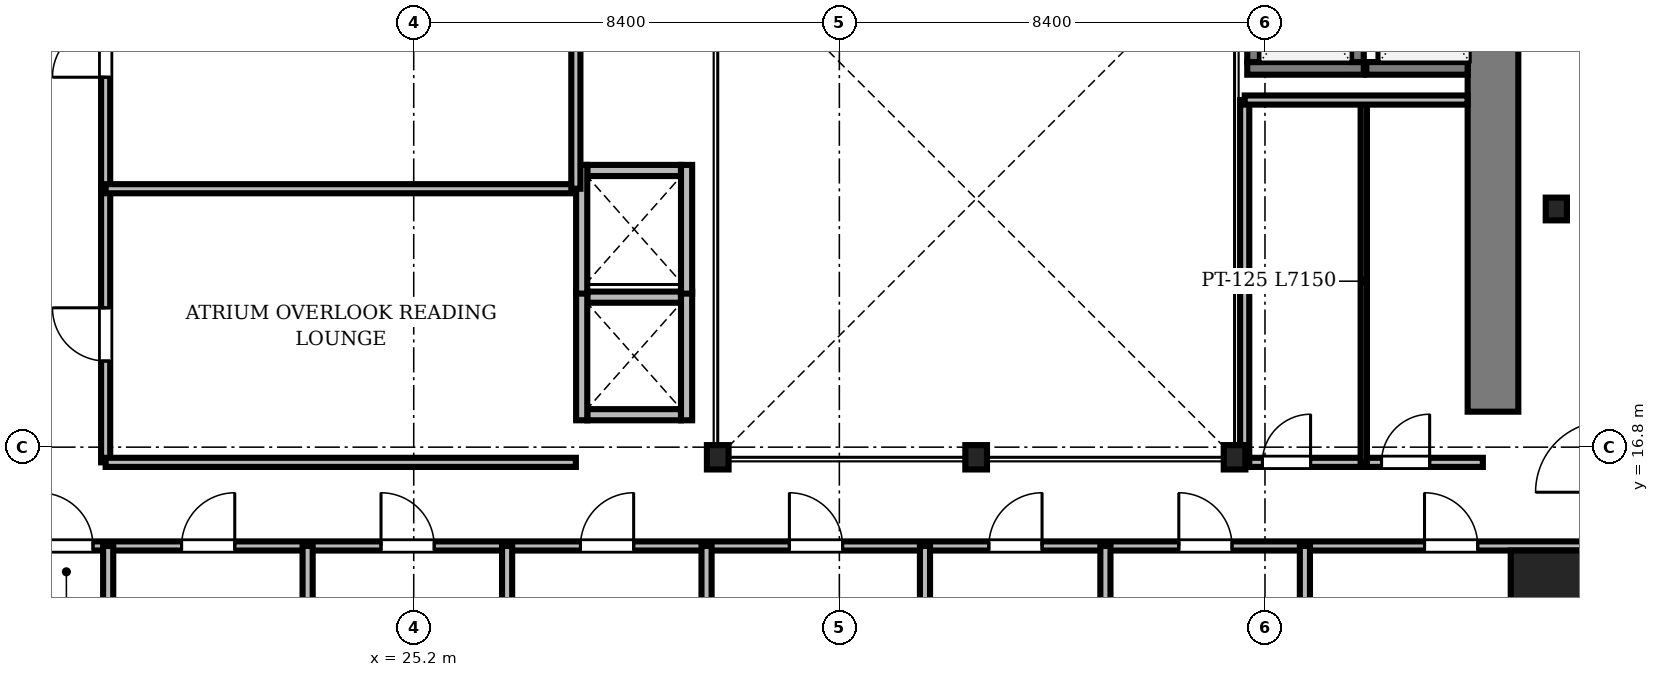
"""IFC4 building model, lengths in metres.
Left out: names, types, materials, properties, quantities, classifications, styles, units other than length and angle.
Written with IfcOpenShell. Run it as: python <this file> out.ifc"""

import sys

from ifc_helpers import new_model, si_unit, direction, frame, frame_2d, origin, origin_2d, place, context, subcontext, project, spatial, rectangle, i_section, extrude, source, transform, mapped, element, fill, save


model = new_model("IFC4")
c1 = context("Model", 3, precision=1e-05, world=origin(), true_north=direction((0.0, 1.0)))
c2 = subcontext(c1, "Body", "Model", "MODEL_VIEW")
j1 = project(units=[si_unit("LENGTHUNIT", "METRE"), si_unit("PLANEANGLEUNIT", "RADIAN")], contexts=[c1])
p1 = place(None, origin())
s1 = spatial("IfcSite", under=j1, at=p1, CompositionType="ELEMENT")
p2 = place(p1, origin())
s2 = spatial("IfcBuilding", under=s1, at=p2, CompositionType="ELEMENT")
p3 = place(p2, frame((0.0, 0.0, 53.15)))
s3 = spatial("IfcBuildingStorey", under=s2, at=p3, CompositionType="ELEMENT", Elevation=53.15)
m1 = source(origin(), c2, "Body", "SweptSolid", [
    extrude(rectangle(XDim=13.15, YDim=1.0, at=frame_2d((6.575, 0.0))), origin(), (0.0, 0.0, 1.0), 3.41),
])
p4 = place(p3, frame((46.5, 17.5, 0.0), z_axis=(0.0, 0.0, 1.0), x_axis=(0.0, 1.0, 0.0)))
e1 = element("IfcWall", 1, at=p4, inside=s3, PredefinedType="SHEAR", context=c2, shape_type="MappedRepresentation", body=[
    mapped(m1, transform((0.0, 0.0, 0.0), scale=1.0)),
])
m2 = source(origin(), c2, "Body", "SweptSolid", [
    extrude(i_section(OverallWidth=0.428, OverallDepth=0.481, WebThickness=0.04, FlangeThickness=0.063, FilletRadius=0.015, at=origin_2d()), origin(), (0.0, 0.0, 1.0), 3.41),
])
for number, where, z_axis, x_axis in (
    (2, (31.2, 16.6, 0.0), (0.0, 0.0, 1.0), (1.0, 0.0, 0.0)),
    (3, (36.3, 16.6, 0.0), (0.0, 0.0, 1.0), (1.0, 0.0, 0.0)),
    (4, (41.4, 16.6, 0.0), (0.0, 0.0, 1.0), (1.0, 0.0, 0.0)),
):
    element("IfcColumn", number, at=place(p3, frame(where, z_axis=z_axis, x_axis=x_axis)), inside=s3, PredefinedType="COLUMN", context=c2, shape_type="MappedRepresentation", body=[
        mapped(m2, transform((0.0, 0.0, 0.0), scale=1.0)),
    ])
m3 = source(origin(), c2, "Body", "SweptSolid", [
    extrude(rectangle(XDim=1.8, YDim=1.8, at=origin_2d()), origin(), (0.0, 0.0, 1.0), 3.41),
])
p5 = place(p3, frame((47.75, 13.86, 0.0), z_axis=(0.0, 0.0, 1.0), x_axis=(1.0, 0.0, 0.0)))
e5 = element("IfcColumn", 5, at=p5, inside=s3, PredefinedType="COLUMN", context=c2, shape_type="MappedRepresentation", body=[
    mapped(m3, transform((0.0, 0.0, 0.0), scale=1.0)),
])
m4 = source(origin(), c2, "Body", "SweptSolid", [
    extrude(i_section(OverallWidth=0.419, OverallDepth=0.449, WebThickness=0.031, FlangeThickness=0.048, FilletRadius=0.015, at=origin_2d()), origin(), (0.0, 0.0, 1.0), 3.41),
])
p6 = place(p3, frame((47.75, 21.5, 0.0), z_axis=(0.0, 0.0, 1.0), x_axis=(1.0, 0.0, 0.0)))
e6 = element("IfcColumn", 6, at=p6, inside=s3, PredefinedType="COLUMN", context=c2, shape_type="MappedRepresentation", body=[
    mapped(m4, transform((0.0, 0.0, 0.0), scale=1.0)),
])
m5 = source(origin(), c2, "Body", "SweptSolid", [
    extrude(rectangle(XDim=1.85, YDim=0.22, at=frame_2d((0.925, 0.0))), origin(), (0.0, 0.0, 1.0), 3.41),
])
for number, where, z_axis, x_axis in (
    (7, (28.625, 17.44, 0.0), (0.0, 0.0, 1.0), (1.0, 0.0, 0.0)),
    (8, (28.625, 19.76, 0.0), (0.0, 0.0, 1.0), (1.0, 0.0, 0.0)),
):
    element("IfcWall", number, at=place(p3, frame(where, z_axis=z_axis, x_axis=x_axis)), inside=s3, PredefinedType="SOLIDWALL", context=c2, shape_type="MappedRepresentation", body=[
        mapped(m5, transform((0.0, 0.0, 0.0), scale=1.0)),
    ])
m6 = source(origin(), c2, "Body", "SweptSolid", [
    extrude(rectangle(XDim=2.54, YDim=0.22, at=frame_2d((1.27, 0.0))), origin(), (0.0, 0.0, 1.0), 3.41),
])
for number, where, z_axis, x_axis in (
    (9, (28.515, 17.33, 0.0), (0.0, 0.0, 1.0), (0.0, 1.0, 0.0)),
    (10, (30.585, 17.33, 0.0), (0.0, 0.0, 1.0), (0.0, 1.0, 0.0)),
):
    element("IfcWall", number, at=place(p3, frame(where, z_axis=z_axis, x_axis=x_axis)), inside=s3, PredefinedType="SOLIDWALL", context=c2, shape_type="MappedRepresentation", body=[
        mapped(m6, transform((0.0, 0.0, 0.0), scale=1.0)),
    ])
p7 = place(p3, frame((28.625, 22.26, 0.0), z_axis=(0.0, 0.0, 1.0), x_axis=(1.0, 0.0, 0.0)))
e11 = element("IfcWall", 11, at=p7, inside=s3, PredefinedType="SOLIDWALL", context=c2, shape_type="MappedRepresentation", body=[
    mapped(m5, transform((0.0, 0.0, 0.0), scale=1.0)),
])
for number, where, z_axis, x_axis in (
    (12, (28.515, 19.83, 0.0), (0.0, 0.0, 1.0), (0.0, 1.0, 0.0)),
    (13, (30.585, 19.83, 0.0), (0.0, 0.0, 1.0), (0.0, 1.0, 0.0)),
):
    element("IfcWall", number, at=place(p3, frame(where, z_axis=z_axis, x_axis=x_axis)), inside=s3, PredefinedType="SOLIDWALL", context=c2, shape_type="MappedRepresentation", body=[
        mapped(m6, transform((0.0, 0.0, 0.0), scale=1.0)),
    ])
m7 = source(origin(), c2, "Body", "SweptSolid", [
    extrude(rectangle(XDim=2.3, YDim=0.25, at=frame_2d((1.15, 0.0))), origin(), (0.0, 0.0, 1.0), 3.41),
])
for number, where, z_axis, x_axis in (
    (14, (41.65, 24.275, 0.0), (0.0, 0.0, 1.0), (1.0, 0.0, 0.0)),
    (15, (41.775, 24.4, 0.0), (0.0, 0.0, 1.0), (0.0, 1.0, 0.0)),
    (16, (43.825, 24.4, 0.0), (0.0, 0.0, 1.0), (0.0, 1.0, 0.0)),
):
    element("IfcWall", number, at=place(p3, frame(where, z_axis=z_axis, x_axis=x_axis)), inside=s3, PredefinedType="SOLIDWALL", context=c2, shape_type="MappedRepresentation", body=[
        mapped(m7, transform((0.0, 0.0, 0.0), scale=1.0)),
    ])
m8 = source(origin(), c2, "Body", "SweptSolid", [
    extrude(rectangle(XDim=2.0, YDim=0.25, at=frame_2d((1.0, 0.0))), origin(), (0.0, 0.0, 1.0), 3.41),
])
p8 = place(p3, frame((44.0, 24.275, 0.0), z_axis=(0.0, 0.0, 1.0), x_axis=(1.0, 0.0, 0.0)))
e17 = element("IfcWall", 17, at=p8, inside=s3, PredefinedType="SOLIDWALL", context=c2, shape_type="MappedRepresentation", body=[
    mapped(m8, transform((0.0, 0.0, 0.0), scale=1.0)),
])
m9 = source(origin(), c2, "Body", "SweptSolid", [
    extrude(rectangle(XDim=46.156, YDim=0.18, at=frame_2d((23.078, 0.0))), origin(), (0.0, 0.0, 1.0), 2.652),
])
p9 = place(p3, frame((2.422, 14.85, 0.0), z_axis=(0.0, 0.0, 1.0), x_axis=(1.0, 0.0, 0.0)))
e18 = element("IfcWall", 18, at=p9, inside=s3, PredefinedType="PARTITIONING", context=c2, shape_type="MappedRepresentation", body=[
    mapped(m9, transform((0.0, 0.0, 0.0), scale=1.0)),
])
m10 = source(origin(), c2, "Body", "SweptSolid", [
    extrude(rectangle(XDim=1.05, YDim=2.2, at=frame_2d((0.525, 1.1))), frame((0.0, 0.1, 0.0), z_axis=(0.0, -1.0, 0.0), x_axis=(1.0, 0.0, 0.0)), (0.0, 0.0, 1.0), 0.2),
])
p10 = place(p9, frame((15.398, 0.0, 0.0)))
e19 = element("IfcOpeningElement", 19, at=p10, cuts=e18, PredefinedType="OPENING", context=c2, shape_type="MappedRepresentation", body=[
    mapped(m10, transform((0.0, 0.0, 0.0), scale=1.0)),
])
p11 = place(p9, frame((18.196, 0.0, 0.0)))
e20 = element("IfcOpeningElement", 20, at=p11, cuts=e18, PredefinedType="OPENING", context=c2, shape_type="MappedRepresentation", body=[
    mapped(m10, transform((0.0, 0.0, 0.0), scale=1.0)),
])
p12 = place(p9, frame((22.132, 0.0, 0.0)))
e21 = element("IfcOpeningElement", 21, at=p12, cuts=e18, PredefinedType="OPENING", context=c2, shape_type="MappedRepresentation", body=[
    mapped(m10, transform((0.0, 0.0, 0.0), scale=1.0)),
])
p13 = place(p9, frame((26.069, 0.0, 0.0)))
e22 = element("IfcOpeningElement", 22, at=p13, cuts=e18, PredefinedType="OPENING", context=c2, shape_type="MappedRepresentation", body=[
    mapped(m10, transform((0.0, 0.0, 0.0), scale=1.0)),
])
p14 = place(p9, frame((30.192, 0.0, 0.0)))
e23 = element("IfcOpeningElement", 23, at=p14, cuts=e18, PredefinedType="OPENING", context=c2, shape_type="MappedRepresentation", body=[
    mapped(m10, transform((0.0, 0.0, 0.0), scale=1.0)),
])
p15 = place(p9, frame((34.128, 0.0, 0.0)))
e24 = element("IfcOpeningElement", 24, at=p15, cuts=e18, PredefinedType="OPENING", context=c2, shape_type="MappedRepresentation", body=[
    mapped(m10, transform((0.0, 0.0, 0.0), scale=1.0)),
])
p16 = place(p9, frame((37.877, 0.0, 0.0)))
e25 = element("IfcOpeningElement", 25, at=p16, cuts=e18, PredefinedType="OPENING", context=c2, shape_type="MappedRepresentation", body=[
    mapped(m10, transform((0.0, 0.0, 0.0), scale=1.0)),
])
p17 = place(p9, frame((42.727, 0.0, 0.0)))
e26 = element("IfcOpeningElement", 26, at=p17, cuts=e18, PredefinedType="OPENING", context=c2, shape_type="MappedRepresentation", body=[
    mapped(m10, transform((0.0, 0.0, 0.0), scale=1.0)),
])
m11 = source(origin(), c2, "Body", "SweptSolid", [
    extrude(rectangle(XDim=6.54, YDim=0.18, at=frame_2d((3.27, 0.0))), origin(), (0.0, 0.0, 1.0), 2.802),
])
p18 = place(p3, frame((19.12, 21.9, 0.0), z_axis=(0.0, 0.0, 1.0), x_axis=(0.0, 1.0, 0.0)))
e27 = element("IfcWall", 27, at=p18, inside=s3, PredefinedType="PARTITIONING", context=c2, shape_type="MappedRepresentation", body=[
    mapped(m11, transform((0.0, 0.0, 0.0), scale=1.0)),
])
p19 = place(p18, frame((2.2, 0.0, 0.0)))
e28 = element("IfcOpeningElement", 28, at=p19, cuts=e27, PredefinedType="OPENING", context=c2, shape_type="MappedRepresentation", body=[
    mapped(m10, transform((0.0, 0.0, 0.0), scale=1.0)),
])
m12 = source(origin(), c2, "Body", "SweptSolid", [
    extrude(rectangle(XDim=5.4, YDim=0.18, at=frame_2d((2.7, 0.0))), origin(), (0.0, 0.0, 1.0), 2.802),
])
p20 = place(p3, frame((19.12, 16.5, 0.0), z_axis=(0.0, 0.0, 1.0), x_axis=(0.0, 1.0, 0.0)))
e29 = element("IfcWall", 29, at=p20, inside=s3, PredefinedType="PARTITIONING", context=c2, shape_type="MappedRepresentation", body=[
    mapped(m12, transform((0.0, 0.0, 0.0), scale=1.0)),
])
p21 = place(p20, frame((2.0, 0.0, 0.0)))
e30 = element("IfcOpeningElement", 30, at=p21, cuts=e29, PredefinedType="OPENING", context=c2, shape_type="MappedRepresentation", body=[
    mapped(m10, transform((0.0, 0.0, 0.0), scale=1.0)),
])
m13 = source(origin(), c2, "Body", "SweptSolid", [
    extrude(rectangle(XDim=4.7, YDim=0.18, at=frame_2d((2.35, 0.0))), origin(), (0.0, 0.0, 1.0), 2.802),
])
p22 = place(p3, frame((41.6, 16.5, 0.0), z_axis=(0.0, 0.0, 1.0), x_axis=(1.0, 0.0, 0.0)))
e31 = element("IfcWall", 31, at=p22, inside=s3, PredefinedType="PARTITIONING", context=c2, shape_type="MappedRepresentation", body=[
    mapped(m13, transform((0.0, 0.0, 0.0), scale=1.0)),
])
m14 = source(origin(), c2, "Body", "SweptSolid", [
    extrude(rectangle(XDim=0.95, YDim=2.15, at=frame_2d((0.475, 1.075))), frame((0.0, 0.1, 0.0), z_axis=(0.0, -1.0, 0.0), x_axis=(1.0, 0.0, 0.0)), (0.0, 0.0, 1.0), 0.2),
])
p23 = place(p22, frame((0.35, 0.0, 0.0)))
e32 = element("IfcOpeningElement", 32, at=p23, cuts=e31, PredefinedType="OPENING", context=c2, shape_type="MappedRepresentation", body=[
    mapped(m14, transform((0.0, 0.0, 0.0), scale=1.0)),
])
p24 = place(p22, frame((2.7, 0.0, 0.0)))
e33 = element("IfcOpeningElement", 33, at=p24, cuts=e31, PredefinedType="OPENING", context=c2, shape_type="MappedRepresentation", body=[
    mapped(m14, transform((0.0, 0.0, 0.0), scale=1.0)),
])
m15 = source(origin(), c2, "Body", "SweptSolid", [
    extrude(rectangle(XDim=12.728, YDim=0.2, at=frame_2d((6.364, 0.0))), origin(), (0.0, 0.0, 1.0), 2.652),
])
p25 = place(p3, frame((19.17, 2.122, 0.0), z_axis=(0.0, 0.0, 1.0), x_axis=(0.0, 1.0, 0.0)))
e34 = element("IfcWall", 34, at=p25, inside=s3, PredefinedType="PARTITIONING", context=c2, shape_type="MappedRepresentation", body=[
    mapped(m15, transform((0.0, 0.0, 0.0), scale=1.0)),
])
m16 = source(origin(), c2, "Body", "SweptSolid", [
    extrude(rectangle(XDim=12.92, YDim=0.2, at=frame_2d((6.46, 0.0))), origin(), (0.0, 0.0, 1.0), 2.652),
])
for number, where, z_axis, x_axis in (
    (35, (23.106, 1.93, 0.0), (0.0, 0.0, 1.0), (0.0, 1.0, 0.0)),
    (36, (27.043, 1.93, 0.0), (0.0, 0.0, 1.0), (0.0, 1.0, 0.0)),
):
    element("IfcWall", number, at=place(p3, frame(where, z_axis=z_axis, x_axis=x_axis)), inside=s3, PredefinedType="PARTITIONING", context=c2, shape_type="MappedRepresentation", body=[
        mapped(m16, transform((0.0, 0.0, 0.0), scale=1.0)),
    ])
for number, where, z_axis, x_axis in (
    (37, (30.979, 2.122, 0.0), (0.0, 0.0, 1.0), (0.0, 1.0, 0.0)),
    (38, (35.29, 2.122, 0.0), (0.0, 0.0, 1.0), (0.0, 1.0, 0.0)),
    (39, (38.851, 2.122, 0.0), (0.0, 0.0, 1.0), (0.0, 1.0, 0.0)),
    (40, (42.788, 2.122, 0.0), (0.0, 0.0, 1.0), (0.0, 1.0, 0.0)),
):
    element("IfcWall", number, at=place(p3, frame(where, z_axis=z_axis, x_axis=x_axis)), inside=s3, PredefinedType="PARTITIONING", context=c2, shape_type="MappedRepresentation", body=[
        mapped(m15, transform((0.0, 0.0, 0.0), scale=1.0)),
    ])
m17 = source(origin(), c2, "Body", "SweptSolid", [
    extrude(rectangle(XDim=9.28, YDim=0.18, at=frame_2d((4.64, 0.0))), origin(), (0.0, 0.0, 1.0), 2.802),
])
p26 = place(p3, frame((19.12, 16.5, 0.0), z_axis=(0.0, 0.0, 1.0), x_axis=(1.0, 0.0, 0.0)))
e41 = element("IfcWall", 41, at=p26, inside=s3, PredefinedType="PARTITIONING", context=c2, shape_type="MappedRepresentation", body=[
    mapped(m17, transform((0.0, 0.0, 0.0), scale=1.0)),
])
m18 = source(origin(), c2, "Body", "SweptSolid", [
    extrude(rectangle(XDim=9.28, YDim=0.18, at=frame_2d((4.64, 0.0))), origin(), (0.0, 0.0, 1.0), 3.41),
])
p27 = place(p3, frame((19.12, 21.9, 0.0), z_axis=(0.0, 0.0, 1.0), x_axis=(1.0, 0.0, 0.0)))
e42 = element("IfcWall", 42, at=p27, inside=s3, PredefinedType="PARTITIONING", context=c2, shape_type="MappedRepresentation", body=[
    mapped(m18, transform((0.0, 0.0, 0.0), scale=1.0)),
])
m19 = source(origin(), c2, "Body", "SweptSolid", [
    extrude(rectangle(XDim=7.15, YDim=0.18, at=frame_2d((3.575, 0.0))), origin(), (0.0, 0.0, 1.0), 2.802),
])
p28 = place(p3, frame((41.6, 16.5, 0.0), z_axis=(0.0, 0.0, 1.0), x_axis=(0.0, 1.0, 0.0)))
e43 = element("IfcWall", 43, at=p28, inside=s3, PredefinedType="PARTITIONING", context=c2, shape_type="MappedRepresentation", body=[
    mapped(m19, transform((0.0, 0.0, 0.0), scale=1.0)),
])
m20 = source(origin(), c2, "Body", "SweptSolid", [
    extrude(rectangle(XDim=7.15, YDim=0.125, at=frame_2d((3.575, 0.0))), origin(), (0.0, 0.0, 1.0), 2.802),
])
p29 = place(p3, frame((43.95, 16.5, 0.0), z_axis=(0.0, 0.0, 1.0), x_axis=(0.0, 1.0, 0.0)))
e44 = element("IfcWall", 44, at=p29, inside=s3, PredefinedType="PARTITIONING", context=c2, shape_type="MappedRepresentation", body=[
    mapped(m20, transform((0.0, 0.0, 0.0), scale=1.0)),
])
p30 = place(p3, frame((28.4, 21.9, 0.0), z_axis=(0.0, 0.0, 1.0), x_axis=(0.0, 1.0, 0.0)))
e45 = element("IfcWall", 45, at=p30, inside=s3, PredefinedType="PARTITIONING", context=c2, shape_type="MappedRepresentation", body=[
    mapped(m11, transform((0.0, 0.0, 0.0), scale=1.0)),
])
m21 = source(origin(), c2, "Body", "SweptSolid", [
    extrude(rectangle(XDim=4.398, YDim=0.18, at=frame_2d((2.199, 0.0))), origin(), (0.0, 0.0, 1.0), 3.41),
])
p31 = place(p3, frame((41.6, 23.65, 0.0), z_axis=(0.0, 0.0, 1.0), x_axis=(1.0, 0.0, 0.0)))
e46 = element("IfcWall", 46, at=p31, inside=s3, PredefinedType="PARTITIONING", context=c2, shape_type="MappedRepresentation", body=[
    mapped(m21, transform((0.0, 0.0, 0.0), scale=1.0)),
])
m22 = source(origin(), c2, "Body", "SweptSolid", [
    extrude(rectangle(XDim=1.05, YDim=2.2, at=frame_2d((0.525, 1.1))), frame((0.0, 0.025, 0.0), z_axis=(0.0, -1.0, 0.0), x_axis=(1.0, 0.0, 0.0)), (0.0, 0.0, 1.0), 0.05),
])
p32 = place(p10, origin())
e47 = element("IfcDoor", 47, at=p32, inside=s3, OperationType="SINGLE_SWING_LEFT", PredefinedType="DOOR", context=c2, shape_type="MappedRepresentation", body=[
    mapped(m22, transform((0.0, 0.0, 0.0), scale=1.0)),
])
fill(e19, e47)
p33 = place(p11, origin())
e48 = element("IfcDoor", 48, at=p33, inside=s3, OperationType="SINGLE_SWING_RIGHT", PredefinedType="DOOR", context=c2, shape_type="MappedRepresentation", body=[
    mapped(m22, transform((0.0, 0.0, 0.0), scale=1.0)),
])
fill(e20, e48)
p34 = place(p12, origin())
e49 = element("IfcDoor", 49, at=p34, inside=s3, OperationType="SINGLE_SWING_LEFT", PredefinedType="DOOR", context=c2, shape_type="MappedRepresentation", body=[
    mapped(m22, transform((0.0, 0.0, 0.0), scale=1.0)),
])
fill(e21, e49)
p35 = place(p13, origin())
e50 = element("IfcDoor", 50, at=p35, inside=s3, OperationType="SINGLE_SWING_RIGHT", PredefinedType="DOOR", context=c2, shape_type="MappedRepresentation", body=[
    mapped(m22, transform((0.0, 0.0, 0.0), scale=1.0)),
])
fill(e22, e50)
p36 = place(p14, origin())
e51 = element("IfcDoor", 51, at=p36, inside=s3, OperationType="SINGLE_SWING_LEFT", PredefinedType="DOOR", context=c2, shape_type="MappedRepresentation", body=[
    mapped(m22, transform((0.0, 0.0, 0.0), scale=1.0)),
])
fill(e23, e51)
p37 = place(p15, origin())
e52 = element("IfcDoor", 52, at=p37, inside=s3, OperationType="SINGLE_SWING_RIGHT", PredefinedType="DOOR", context=c2, shape_type="MappedRepresentation", body=[
    mapped(m22, transform((0.0, 0.0, 0.0), scale=1.0)),
])
fill(e24, e52)
p38 = place(p16, origin())
e53 = element("IfcDoor", 53, at=p38, inside=s3, OperationType="SINGLE_SWING_LEFT", PredefinedType="DOOR", context=c2, shape_type="MappedRepresentation", body=[
    mapped(m22, transform((0.0, 0.0, 0.0), scale=1.0)),
])
fill(e25, e53)
p39 = place(p17, origin())
e54 = element("IfcDoor", 54, at=p39, inside=s3, OperationType="SINGLE_SWING_LEFT", PredefinedType="DOOR", context=c2, shape_type="MappedRepresentation", body=[
    mapped(m22, transform((0.0, 0.0, 0.0), scale=1.0)),
])
fill(e26, e54)
p40 = place(p19, origin())
e55 = element("IfcDoor", 55, at=p40, inside=s3, OperationType="SINGLE_SWING_LEFT", PredefinedType="DOOR", context=c2, shape_type="MappedRepresentation", body=[
    mapped(m22, transform((0.0, 0.0, 0.0), scale=1.0)),
])
fill(e28, e55)
p41 = place(p21, origin())
e56 = element("IfcDoor", 56, at=p41, inside=s3, OperationType="SINGLE_SWING_RIGHT", PredefinedType="DOOR", context=c2, shape_type="MappedRepresentation", body=[
    mapped(m22, transform((0.0, 0.0, 0.0), scale=1.0)),
])
fill(e30, e56)
m23 = source(origin(), c2, "Body", "SweptSolid", [
    extrude(rectangle(XDim=0.95, YDim=2.15, at=frame_2d((0.475, 1.075))), frame((0.0, 0.025, 0.0), z_axis=(0.0, -1.0, 0.0), x_axis=(1.0, 0.0, 0.0)), (0.0, 0.0, 1.0), 0.05),
])
p42 = place(p23, origin())
e57 = element("IfcDoor", 57, at=p42, inside=s3, OperationType="SINGLE_SWING_RIGHT", PredefinedType="DOOR", context=c2, shape_type="MappedRepresentation", body=[
    mapped(m23, transform((0.0, 0.0, 0.0), scale=1.0)),
])
fill(e32, e57)
p43 = place(p24, origin())
e58 = element("IfcDoor", 58, at=p43, inside=s3, OperationType="SINGLE_SWING_RIGHT", PredefinedType="DOOR", context=c2, shape_type="MappedRepresentation", body=[
    mapped(m23, transform((0.0, 0.0, 0.0), scale=1.0)),
])
fill(e33, e58)
save(model, sys.argv[1])
